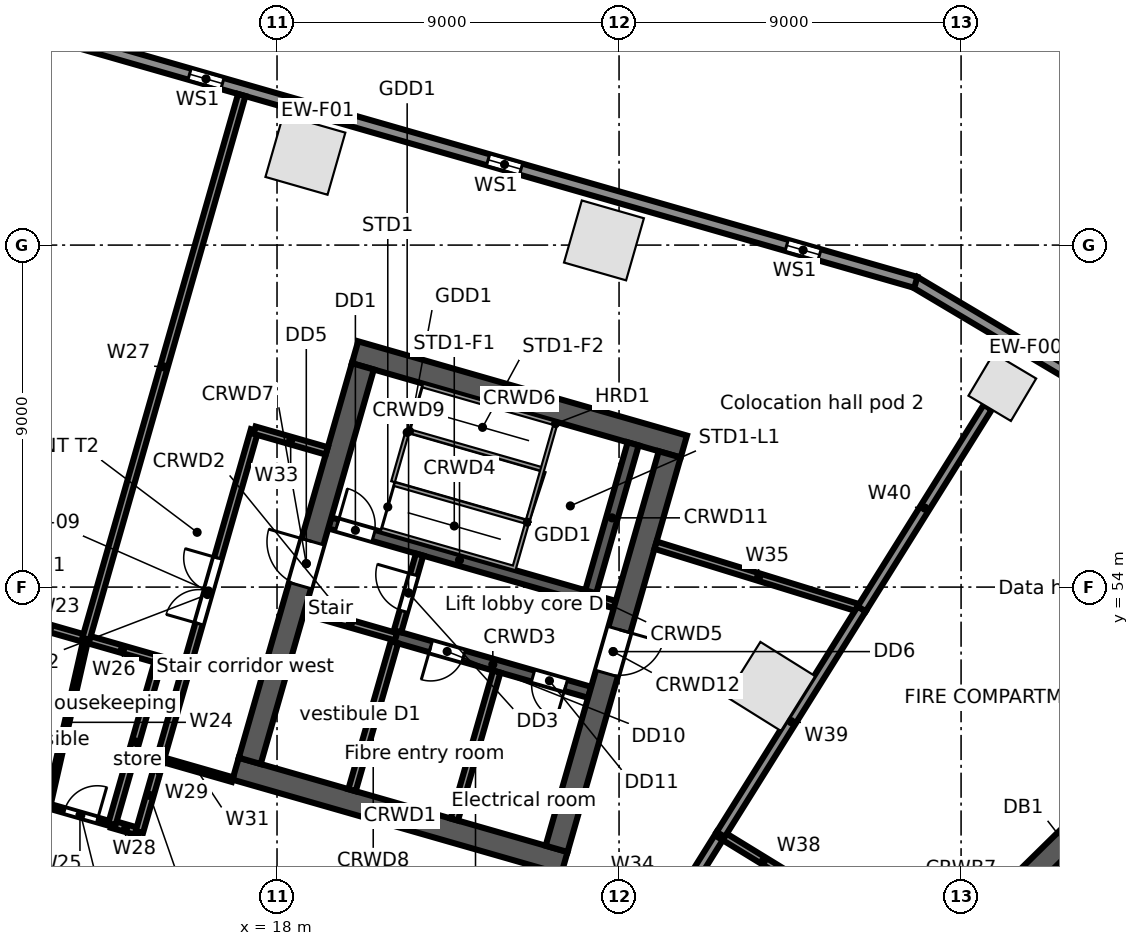
"""IFC4 building model, lengths in metres.
Left out: names, types, materials, properties, quantities, classifications, styles, units other than length and angle.
Written with IfcOpenShell. Run it as: python <this file> out.ifc"""

import sys

from ifc_helpers import new_model, si_unit, direction, frame, frame_2d, origin, origin_2d, place, context, subcontext, project, spatial, rectangle, extrude, element, fill, save


model = new_model("IFC4")
c1 = context("Model", 3, precision=1e-05, world=origin(), true_north=direction((0.0, 1.0)))
c2 = subcontext(c1, "Body", "Model", "MODEL_VIEW")
j1 = project(units=[si_unit("LENGTHUNIT", "METRE"), si_unit("PLANEANGLEUNIT", "RADIAN")], contexts=[c1])
p1 = place(None, origin())
s1 = spatial("IfcSite", under=j1, at=p1, CompositionType="ELEMENT")
p2 = place(p1, origin())
s2 = spatial("IfcBuilding", under=s1, at=p2, CompositionType="ELEMENT")
p3 = place(p2, frame((0.0, 0.0, 36.5)))
s3 = spatial("IfcBuildingStorey", under=s2, at=p3, CompositionType="ELEMENT", Elevation=36.5)
p4 = place(p3, frame((37.085, 59.262, 0.0), z_axis=(0.0, 0.0, 1.0), x_axis=(-0.859406411501, 0.511293086077, 0.0)))
e1 = element("IfcColumn", 1, at=p4, inside=s3, PredefinedType="COLUMN", context=c2, shape_type="SweptSolid", body=[
    extrude(rectangle(XDim=1.3, YDim=1.3, at=origin_2d()), origin(), (0.0, 0.0, 1.0), 5.0),
])
for number, where, z_axis, x_axis in (
    (2, (26.603, 63.124, 0.0), (0.0, 0.0, 1.0), (-0.961, 0.276, 0.0)),
    (3, (18.746, 65.376, 0.0), (0.0, 0.0, 1.0), (-0.961, 0.276, 0.0)),
    (4, (30.99, 51.386, 0.0), (0.0, 0.0, 1.0), (0.53, 0.848, 0.0)),
):
    element("IfcColumn", number, at=place(p3, frame(where, z_axis=z_axis, x_axis=x_axis)), inside=s3, PredefinedType="COLUMN", context=c2, shape_type="SweptSolid", body=[
        extrude(rectangle(XDim=1.7, YDim=1.7, at=origin_2d()), origin(), (0.0, 0.0, 1.0), 5.0),
    ])
p5 = place(p3, frame((34.773, 62.034, 0.0), z_axis=(0.0, 0.0, 1.0), x_axis=(0.859401317772, -0.511301647769, 0.0)))
e5 = element("IfcWall", 5, at=p5, inside=s3, PredefinedType="STANDARD", context=c2, shape_type="SweptSolid", body=[
    extrude(rectangle(XDim=6.808, YDim=0.3, at=frame_2d((3.404, 0.0))), origin(), (0.0, 0.0, 1.0), 4.68),
])
p6 = place(p3, frame((3.335, 71.044, 0.0), z_axis=(0.0, 0.0, 1.0), x_axis=(0.961260130989, -0.275642813387, 0.0)))
e6 = element("IfcWall", 6, at=p6, inside=s3, PredefinedType="STANDARD", context=c2, shape_type="SweptSolid", body=[
    extrude(rectangle(XDim=32.741, YDim=0.3, at=frame_2d((16.371, 0.0))), origin(), (0.0, 0.0, 1.0), 4.68),
])
p7 = place(p6, frame((29.207, 0.0, 0.6)))
e7 = element("IfcOpeningElement", 7, at=p7, cuts=e6, PredefinedType="OPENING", context=c2, shape_type="SweptSolid", body=[
    extrude(rectangle(XDim=0.9, YDim=3.2, at=frame_2d((0.45, 1.6))), frame((0.0, 0.16, 0.0), z_axis=(0.0, -1.0, 0.0), x_axis=(1.0, 0.0, 0.0)), (0.0, 0.0, 1.0), 0.32),
])
p8 = place(p6, frame((21.034, 0.0, 0.6)))
e8 = element("IfcOpeningElement", 8, at=p8, cuts=e6, PredefinedType="OPENING", context=c2, shape_type="SweptSolid", body=[
    extrude(rectangle(XDim=0.9, YDim=3.2, at=frame_2d((0.45, 1.6))), frame((0.0, 0.16, 0.0), z_axis=(0.0, -1.0, 0.0), x_axis=(1.0, 0.0, 0.0)), (0.0, 0.0, 1.0), 0.32),
])
p9 = place(p6, frame((12.861, 0.0, 0.6)))
e9 = element("IfcOpeningElement", 9, at=p9, cuts=e6, PredefinedType="OPENING", context=c2, shape_type="SweptSolid", body=[
    extrude(rectangle(XDim=0.9, YDim=3.2, at=frame_2d((0.45, 1.6))), frame((0.0, 0.16, 0.0), z_axis=(0.0, -1.0, 0.0), x_axis=(1.0, 0.0, 0.0)), (0.0, 0.0, 1.0), 0.32),
])
p10 = place(p6, frame((4.688, 0.0, 0.6)))
e10 = element("IfcOpeningElement", 10, at=p10, cuts=e6, PredefinedType="OPENING", context=c2, shape_type="SweptSolid", body=[
    extrude(rectangle(XDim=0.9, YDim=3.2, at=frame_2d((0.45, 1.6))), frame((0.0, 0.16, 0.0), z_axis=(0.0, -1.0, 0.0), x_axis=(1.0, 0.0, 0.0)), (0.0, 0.0, 1.0), 0.32),
])
p11 = place(p3, frame((25.398, 40.717, 0.0), z_axis=(0.0, 0.0, 1.0), x_axis=(-0.961262423262, 0.275634819324, 0.0)))
e11 = element("IfcWall", 11, at=p11, inside=s3, PredefinedType="STANDARD", context=c2, shape_type="SweptSolid", body=[
    extrude(rectangle(XDim=26.359, YDim=0.3, at=frame_2d((13.179, 0.0))), origin(), (0.0, 0.0, 1.0), 4.68),
])
p12 = place(p11, frame((22.664, 0.0, 0.6)))
e12 = element("IfcOpeningElement", 12, at=p12, cuts=e11, PredefinedType="OPENING", context=c2, shape_type="SweptSolid", body=[
    extrude(rectangle(XDim=0.9, YDim=3.2, at=frame_2d((0.45, 1.6))), frame((0.0, 0.16, 0.0), z_axis=(0.0, -1.0, 0.0), x_axis=(1.0, 0.0, 0.0)), (0.0, 0.0, 1.0), 0.32),
])
p13 = place(p11, frame((13.844, 0.0, 0.6)))
e13 = element("IfcOpeningElement", 13, at=p13, cuts=e11, PredefinedType="OPENING", context=c2, shape_type="SweptSolid", body=[
    extrude(rectangle(XDim=0.9, YDim=3.2, at=frame_2d((0.45, 1.6))), frame((0.0, 0.16, 0.0), z_axis=(0.0, -1.0, 0.0), x_axis=(1.0, 0.0, 0.0)), (0.0, 0.0, 1.0), 0.32),
])
p14 = place(p11, frame((5.023, 0.0, 0.6)))
e14 = element("IfcOpeningElement", 14, at=p14, cuts=e11, PredefinedType="OPENING", context=c2, shape_type="SweptSolid", body=[
    extrude(rectangle(XDim=0.9, YDim=3.2, at=frame_2d((0.45, 1.6))), frame((0.0, 0.16, 0.0), z_axis=(0.0, -1.0, 0.0), x_axis=(1.0, 0.0, 0.0)), (0.0, 0.0, 1.0), 0.32),
])
p15 = place(p3, frame((32.07, 40.759, 0.0), z_axis=(0.0, 0.0, 1.0), x_axis=(0.713245344712, 0.70091445858, 0.0)))
e15 = element("IfcWall", 15, at=p15, inside=s3, PredefinedType="SOLIDWALL", context=c2, shape_type="SweptSolid", body=[
    extrude(rectangle(XDim=13.8, YDim=0.6, at=frame_2d((6.9, 0.0))), origin(), (0.0, 0.0, 1.0), 4.68),
])
p16 = place(p3, frame((16.911, 49.221, 0.0), z_axis=(0.0, 0.0, 1.0), x_axis=(0.96126248289, -0.275634611374, 0.0)))
e16 = element("IfcWall", 16, at=p16, inside=s3, PredefinedType="SOLIDWALL", context=c2, shape_type="SweptSolid", body=[
    extrude(rectangle(XDim=9.0, YDim=0.6, at=frame_2d((4.5, 0.0))), origin(), (0.0, 0.0, 1.0), 4.68),
])
p17 = place(p3, frame((18.728, 53.382, 0.0), z_axis=(0.0, 0.0, 1.0), x_axis=(0.961247070632, -0.275688355216, 0.0)))
e17 = element("IfcWall", 17, at=p17, inside=s3, PredefinedType="SOLIDWALL", context=c2, shape_type="SweptSolid", body=[
    extrude(rectangle(XDim=2.5, YDim=0.2, at=frame_2d((1.25, 0.0))), origin(), (0.0, 0.0, 1.0), 4.68),
])
p18 = place(p3, frame((21.131, 52.692, 0.0), z_axis=(0.0, 0.0, 1.0), x_axis=(0.961271492568, -0.275603188616, 0.0)))
e18 = element("IfcWall", 18, at=p18, inside=s3, PredefinedType="SOLIDWALL", context=c2, shape_type="SweptSolid", body=[
    extrude(rectangle(XDim=5.3, YDim=0.3, at=frame_2d((2.65, 0.0))), origin(), (0.0, 0.0, 1.0), 4.68),
])
p19 = place(p18, frame((0.95, 0.0, 0.0)))
e19 = element("IfcOpeningElement", 19, at=p19, cuts=e18, PredefinedType="OPENING", context=c2, shape_type="SweptSolid", body=[
    extrude(rectangle(XDim=0.9, YDim=2.1, at=frame_2d((0.45, 1.05))), frame((0.0, 0.16, 0.0), z_axis=(0.0, -1.0, 0.0), x_axis=(1.0, 0.0, 0.0)), (0.0, 0.0, 1.0), 0.32),
])
p20 = place(p18, frame((3.75, 0.0, 0.0)))
e20 = element("IfcOpeningElement", 20, at=p20, cuts=e18, PredefinedType="OPENING", context=c2, shape_type="SweptSolid", body=[
    extrude(rectangle(XDim=0.9, YDim=2.1, at=frame_2d((0.45, 1.05))), frame((0.0, 0.16, 0.0), z_axis=(0.0, -1.0, 0.0), x_axis=(1.0, 0.0, 0.0)), (0.0, 0.0, 1.0), 0.32),
])
p21 = place(p3, frame((19.389, 55.689, 0.0), z_axis=(0.0, 0.0, 1.0), x_axis=(0.961261397636, -0.275638396117, 0.0)))
e21 = element("IfcWall", 21, at=p21, inside=s3, PredefinedType="SOLIDWALL", context=c2, shape_type="SweptSolid", body=[
    extrude(rectangle(XDim=7.1, YDim=0.3, at=frame_2d((3.55, 0.0))), origin(), (0.0, 0.0, 1.0), 4.68),
])
p22 = place(p21, frame((0.2, 0.0, 0.0)))
e22 = element("IfcOpeningElement", 22, at=p22, cuts=e21, PredefinedType="OPENING", context=c2, shape_type="SweptSolid", body=[
    extrude(rectangle(XDim=1.0, YDim=2.1, at=frame_2d((0.5, 1.05))), frame((0.0, 0.16, 0.0), z_axis=(0.0, -1.0, 0.0), x_axis=(1.0, 0.0, 0.0)), (0.0, 0.0, 1.0), 0.32),
])
p23 = place(p3, frame((26.214, 53.732, 0.0), z_axis=(0.0, 0.0, 1.0), x_axis=(0.96122076476, -0.27578005982, 0.0)))
e23 = element("IfcWall", 23, at=p23, inside=s3, PredefinedType="SOLIDWALL", context=c2, shape_type="SweptSolid", body=[
    extrude(rectangle(XDim=0.7, YDim=0.2, at=frame_2d((0.35, 0.0))), origin(), (0.0, 0.0, 1.0), 4.68),
])
p24 = place(p3, frame((20.053, 60.18, 0.0), z_axis=(0.0, 0.0, 1.0), x_axis=(0.96126248289, -0.275634611374, 0.0)))
e24 = element("IfcWall", 24, at=p24, inside=s3, PredefinedType="SOLIDWALL", context=c2, shape_type="SweptSolid", body=[
    extrude(rectangle(XDim=9.0, YDim=0.6, at=frame_2d((4.5, 0.0))), origin(), (0.0, 0.0, 1.0), 4.68),
])
p25 = place(p3, frame((17.282, 49.427, 0.0), z_axis=(0.0, 0.0, 1.0), x_axis=(0.275631631629, 0.961263337304, 0.0)))
e25 = element("IfcWall", 25, at=p25, inside=s3, PredefinedType="SOLIDWALL", context=c2, shape_type="SweptSolid", body=[
    extrude(rectangle(XDim=10.8, YDim=0.6, at=frame_2d((5.4, 0.0))), origin(), (0.0, 0.0, 1.0), 4.68),
])
p26 = place(p25, frame((4.8, 0.0, 0.0)))
e26 = element("IfcOpeningElement", 26, at=p26, cuts=e25, PredefinedType="OPENING", context=c2, shape_type="SweptSolid", body=[
    extrude(rectangle(XDim=1.2, YDim=2.1, at=frame_2d((0.6, 1.05))), frame((0.0, 0.31, 0.0), z_axis=(0.0, -1.0, 0.0), x_axis=(1.0, 0.0, 0.0)), (0.0, 0.0, 1.0), 0.62),
])
p27 = place(p3, frame((19.973, 48.655, 0.0), z_axis=(0.0, 0.0, 1.0), x_axis=(0.275668441653, 0.961252781674, 0.0)))
e27 = element("IfcWall", 27, at=p27, inside=s3, PredefinedType="SOLIDWALL", context=c2, shape_type="SweptSolid", body=[
    extrude(rectangle(XDim=4.05, YDim=0.2, at=frame_2d((2.025, 0.0))), origin(), (0.0, 0.0, 1.0), 4.68),
])
p28 = place(p3, frame((21.172, 52.837, 0.0), z_axis=(0.0, 0.0, 1.0), x_axis=(0.275657676022, 0.961255868981, 0.0)))
e28 = element("IfcWall", 28, at=p28, inside=s3, PredefinedType="PARTITIONING", context=c2, shape_type="SweptSolid", body=[
    extrude(rectangle(XDim=2.1, YDim=0.2, at=frame_2d((1.05, 0.0))), origin(), (0.0, 0.0, 1.0), 4.68),
])
p29 = place(p28, frame((0.55, 0.0, 0.0)))
e29 = element("IfcOpeningElement", 29, at=p29, cuts=e28, PredefinedType="OPENING", context=c2, shape_type="SweptSolid", body=[
    extrude(rectangle(XDim=1.0, YDim=2.1, at=frame_2d((0.5, 1.05))), frame((0.0, 0.11, 0.0), z_axis=(0.0, -1.0, 0.0), x_axis=(1.0, 0.0, 0.0)), (0.0, 0.0, 1.0), 0.22),
])
p30 = place(p3, frame((22.665, 47.883, 0.0), z_axis=(0.0, 0.0, 1.0), x_axis=(0.275596769212, 0.961273333033, 0.0)))
e30 = element("IfcWall", 30, at=p30, inside=s3, PredefinedType="PARTITIONING", context=c2, shape_type="SweptSolid", body=[
    extrude(rectangle(XDim=4.05, YDim=0.2, at=frame_2d((2.025, 0.0))), origin(), (0.0, 0.0, 1.0), 4.68),
])
p31 = place(p3, frame((26.256, 53.876, 0.0), z_axis=(0.0, 0.0, 1.0), x_axis=(0.275612739511, 0.961268754209, 0.0)))
e31 = element("IfcWall", 31, at=p31, inside=s3, PredefinedType="SOLIDWALL", context=c2, shape_type="SweptSolid", body=[
    extrude(rectangle(XDim=4.05, YDim=0.3, at=frame_2d((2.025, 0.0))), origin(), (0.0, 0.0, 1.0), 4.68),
])
p32 = place(p3, frame((25.356, 47.112, 0.0), z_axis=(0.0, 0.0, 1.0), x_axis=(0.275631631629, 0.961263337304, 0.0)))
e32 = element("IfcWall", 32, at=p32, inside=s3, PredefinedType="SOLIDWALL", context=c2, shape_type="SweptSolid", body=[
    extrude(rectangle(XDim=10.8, YDim=0.6, at=frame_2d((5.4, 0.0))), origin(), (0.0, 0.0, 1.0), 4.68),
])
p33 = place(p32, frame((4.8, 0.0, 0.0)))
e33 = element("IfcOpeningElement", 33, at=p33, cuts=e32, PredefinedType="OPENING", context=c2, shape_type="SweptSolid", body=[
    extrude(rectangle(XDim=1.2, YDim=2.1, at=frame_2d((0.6, 1.05))), frame((0.0, 0.31, 0.0), z_axis=(0.0, -1.0, 0.0), x_axis=(1.0, 0.0, 0.0)), (0.0, 0.0, 1.0), 0.62),
])
p34 = place(p3, frame((11.051, 53.19, 0.0), z_axis=(0.0, 0.0, 1.0), x_axis=(0.961316434736, -0.275446387355, 0.0)))
e34 = element("IfcWall", 34, at=p34, inside=s3, PredefinedType="PARTITIONING", context=c2, shape_type="SweptSolid", body=[
    extrude(rectangle(XDim=2.0, YDim=0.2, at=frame_2d((1.0, 0.0))), origin(), (0.0, 0.0, 1.0), 4.68),
])
p35 = place(p3, frame((11.973, 48.244, 0.0), z_axis=(0.0, 0.0, 1.0), x_axis=(0.222117362571, 0.975019936845, 0.0)))
e35 = element("IfcWall", 35, at=p35, inside=s3, PredefinedType="PARTITIONING", context=c2, shape_type="SweptSolid", body=[
    extrude(rectangle(XDim=4.508, YDim=0.125, at=frame_2d((2.254, 0.0))), origin(), (0.0, 0.0, 1.0), 4.68),
])
p36 = place(p3, frame((11.973, 48.244, 0.0), z_axis=(0.0, 0.0, 1.0), x_axis=(0.96136592135, -0.275273618907, 0.0)))
e36 = element("IfcWall", 36, at=p36, inside=s3, PredefinedType="PARTITIONING", context=c2, shape_type="SweptSolid", body=[
    extrude(rectangle(XDim=1.751, YDim=0.125, at=frame_2d((0.875, 0.0))), origin(), (0.0, 0.0, 1.0), 4.68),
])
p37 = place(p36, frame((0.45, 0.0, 0.0)))
e37 = element("IfcOpeningElement", 37, at=p37, cuts=e36, PredefinedType="OPENING", context=c2, shape_type="SweptSolid", body=[
    extrude(rectangle(XDim=0.9, YDim=2.1, at=frame_2d((0.45, 1.05))), frame((0.0, 0.073, 0.0), z_axis=(0.0, -1.0, 0.0), x_axis=(1.0, 0.0, 0.0)), (0.0, 0.0, 1.0), 0.145),
])
p38 = place(p3, frame((12.974, 52.639, 0.0), z_axis=(0.0, 0.0, 1.0), x_axis=(0.961270097305, -0.275608055084, 0.0)))
e38 = element("IfcWall", 38, at=p38, inside=s3, PredefinedType="PARTITIONING", context=c2, shape_type="SweptSolid", body=[
    extrude(rectangle(XDim=1.999, YDim=0.2, at=frame_2d((1.0, 0.0))), origin(), (0.0, 0.0, 1.0), 4.68),
])
p39 = place(p3, frame((12.974, 52.639, 0.0), z_axis=(0.0, 0.0, 1.0), x_axis=(0.275299463768, 0.961358520662, 0.0)))
e39 = element("IfcWall", 39, at=p39, inside=s3, PredefinedType="PARTITIONING", context=c2, shape_type="SweptSolid", body=[
    extrude(rectangle(XDim=14.885, YDim=0.2, at=frame_2d((7.443, 0.0))), origin(), (0.0, 0.0, 1.0), 3.742),
])
p40 = place(p3, frame((13.656, 47.762, 0.0), z_axis=(0.0, 0.0, 1.0), x_axis=(0.961154610169, -0.276010534854, 0.0)))
e40 = element("IfcWall", 40, at=p40, inside=s3, PredefinedType="PARTITIONING", context=c2, shape_type="SweptSolid", body=[
    extrude(rectangle(XDim=0.75, YDim=0.2, at=frame_2d((0.375, 0.0))), origin(), (0.0, 0.0, 1.0), 4.68),
])
p41 = place(p3, frame((13.656, 47.762, 0.0), z_axis=(0.0, 0.0, 1.0), x_axis=(0.275545040649, 0.96128816209, 0.0)))
e41 = element("IfcWall", 41, at=p41, inside=s3, PredefinedType="PARTITIONING", context=c2, shape_type="SweptSolid", body=[
    extrude(rectangle(XDim=4.5, YDim=0.2, at=frame_2d((2.25, 0.0))), origin(), (0.0, 0.0, 1.0), 4.68),
])
p42 = place(p3, frame((14.377, 47.555, 0.0), z_axis=(0.0, 0.0, 1.0), x_axis=(0.275446387355, 0.961316434736, 0.0)))
e42 = element("IfcWall", 42, at=p42, inside=s3, PredefinedType="PARTITIONING", context=c2, shape_type="SweptSolid", body=[
    extrude(rectangle(XDim=2.0, YDim=0.2, at=frame_2d((1.0, 0.0))), origin(), (0.0, 0.0, 1.0), 4.68),
])
p43 = place(p3, frame((14.928, 49.478, 0.0), z_axis=(0.0, 0.0, 1.0), x_axis=(0.961243778232, -0.27569983462, 0.0)))
e43 = element("IfcWall", 43, at=p43, inside=s3, PredefinedType="PARTITIONING", context=c2, shape_type="SweptSolid", body=[
    extrude(rectangle(XDim=1.977, YDim=0.125, at=frame_2d((0.988, 0.0))), origin(), (0.0, 0.0, 1.0), 4.68),
])
p44 = place(p3, frame((14.928, 49.478, 0.0), z_axis=(0.0, 0.0, 1.0), x_axis=(0.275674053528, 0.961251172281, 0.0)))
e44 = element("IfcWall", 44, at=p44, inside=s3, PredefinedType="PARTITIONING", context=c2, shape_type="SweptSolid", body=[
    extrude(rectangle(XDim=9.0, YDim=0.2, at=frame_2d((4.5, 0.0))), origin(), (0.0, 0.0, 1.0), 3.742),
])
p45 = place(p44, frame((3.7, 0.0, 0.0)))
e45 = element("IfcOpeningElement", 45, at=p45, cuts=e44, PredefinedType="OPENING", context=c2, shape_type="SweptSolid", body=[
    extrude(rectangle(XDim=1.8, YDim=2.1, at=frame_2d((0.9, 1.05))), frame((0.0, 0.11, 0.0), z_axis=(0.0, -1.0, 0.0), x_axis=(1.0, 0.0, 0.0)), (0.0, 0.0, 1.0), 0.22),
])
p46 = place(p3, frame((17.409, 58.129, 0.0), z_axis=(0.0, 0.0, 1.0), x_axis=(0.961253165474, -0.275667103345, 0.0)))
e46 = element("IfcWall", 46, at=p46, inside=s3, PredefinedType="PARTITIONING", context=c2, shape_type="SweptSolid", body=[
    extrude(rectangle(XDim=1.977, YDim=0.2, at=frame_2d((0.988, 0.0))), origin(), (0.0, 0.0, 1.0), 4.68),
])
p47 = place(p3, frame((26.456, 42.338, 0.0), z_axis=(0.0, 0.0, 1.0), x_axis=(0.52980027265, 0.848122438743, 0.0)))
e47 = element("IfcWall", 47, at=p47, inside=s3, PredefinedType="PARTITIONING", context=c2, shape_type="SweptSolid", body=[
    extrude(rectangle(XDim=6.076, YDim=0.25, at=frame_2d((3.038, 0.0))), origin(), (0.0, 0.0, 1.0), 4.68),
])
p48 = place(p47, frame((2.2, 0.0, 0.0)))
e48 = element("IfcOpeningElement", 48, at=p48, cuts=e47, PredefinedType="OPENING", context=c2, shape_type="SweptSolid", body=[
    extrude(rectangle(XDim=1.8, YDim=2.1, at=frame_2d((0.9, 1.05))), frame((0.0, 0.135, 0.0), z_axis=(0.0, -1.0, 0.0), x_axis=(1.0, 0.0, 0.0)), (0.0, 0.0, 1.0), 0.27),
])
p49 = place(p3, frame((27.96, 55.103, 0.0), z_axis=(0.0, 0.0, 1.0), x_axis=(0.955442775069, -0.29517639399, 0.0)))
e49 = element("IfcWall", 49, at=p49, inside=s3, PredefinedType="PARTITIONING", context=c2, shape_type="SweptSolid", body=[
    extrude(rectangle(XDim=5.678, YDim=0.2, at=frame_2d((2.839, 0.0))), origin(), (0.0, 0.0, 1.0), 3.748),
])
p50 = place(p3, frame((29.675, 47.491, 0.0), z_axis=(0.0, 0.0, 1.0), x_axis=(0.852591965232, -0.522577210392, 0.0)))
e50 = element("IfcWall", 50, at=p50, inside=s3, PredefinedType="PARTITIONING", context=c2, shape_type="SweptSolid", body=[
    extrude(rectangle(XDim=2.645, YDim=0.2, at=frame_2d((1.322, 0.0))), origin(), (0.0, 0.0, 1.0), 4.68),
])
p51 = place(p3, frame((29.675, 47.491, 0.0), z_axis=(0.0, 0.0, 1.0), x_axis=(0.529992669945, 0.848002222759, 0.0)))
e51 = element("IfcWall", 51, at=p51, inside=s3, PredefinedType="PARTITIONING", context=c2, shape_type="SweptSolid", body=[
    extrude(rectangle(XDim=7.0, YDim=0.25, at=frame_2d((3.5, 0.0))), origin(), (0.0, 0.0, 1.0), 3.742),
])
p52 = place(p3, frame((33.385, 53.427, 0.0), z_axis=(0.0, 0.0, 1.0), x_axis=(0.529897235032, 0.848061861131, 0.0)))
e52 = element("IfcWall", 52, at=p52, inside=s3, PredefinedType="PARTITIONING", context=c2, shape_type="SweptSolid", body=[
    extrude(rectangle(XDim=6.258, YDim=0.25, at=frame_2d((3.129, 0.0))), origin(), (0.0, 0.0, 1.0), 3.742),
])
p53 = place(p7, origin())
e53 = element("IfcWindow", 53, at=p53, inside=s3, PartitioningType="SINGLE_PANEL", PredefinedType="WINDOW", context=c2, shape_type="SweptSolid", body=[
    extrude(rectangle(XDim=0.9, YDim=3.2, at=frame_2d((0.45, 1.6))), frame((0.0, 0.03, 0.0), z_axis=(0.0, -1.0, 0.0), x_axis=(1.0, 0.0, 0.0)), (0.0, 0.0, 1.0), 0.06),
])
fill(e7, e53)
p54 = place(p8, origin())
e54 = element("IfcWindow", 54, at=p54, inside=s3, PartitioningType="SINGLE_PANEL", PredefinedType="WINDOW", context=c2, shape_type="SweptSolid", body=[
    extrude(rectangle(XDim=0.9, YDim=3.2, at=frame_2d((0.45, 1.6))), frame((0.0, 0.03, 0.0), z_axis=(0.0, -1.0, 0.0), x_axis=(1.0, 0.0, 0.0)), (0.0, 0.0, 1.0), 0.06),
])
fill(e8, e54)
p55 = place(p9, origin())
e55 = element("IfcWindow", 55, at=p55, inside=s3, PartitioningType="SINGLE_PANEL", PredefinedType="WINDOW", context=c2, shape_type="SweptSolid", body=[
    extrude(rectangle(XDim=0.9, YDim=3.2, at=frame_2d((0.45, 1.6))), frame((0.0, 0.03, 0.0), z_axis=(0.0, -1.0, 0.0), x_axis=(1.0, 0.0, 0.0)), (0.0, 0.0, 1.0), 0.06),
])
fill(e9, e55)
p56 = place(p22, origin())
e56 = element("IfcDoor", 56, at=p56, inside=s3, OperationType="SINGLE_SWING_LEFT", PredefinedType="DOOR", context=c2, shape_type="SweptSolid", body=[
    extrude(rectangle(XDim=1.0, YDim=2.1, at=frame_2d((0.5, 1.05))), frame((0.0, 0.025, 0.0), z_axis=(0.0, -1.0, 0.0), x_axis=(1.0, 0.0, 0.0)), (0.0, 0.0, 1.0), 0.05),
])
fill(e22, e56)
p57 = place(p29, origin())
e57 = element("IfcDoor", 57, at=p57, inside=s3, OperationType="SINGLE_SWING_RIGHT", PredefinedType="DOOR", context=c2, shape_type="SweptSolid", body=[
    extrude(rectangle(XDim=1.0, YDim=2.1, at=frame_2d((0.5, 1.05))), frame((0.0, 0.025, 0.0), z_axis=(0.0, -1.0, 0.0), x_axis=(1.0, 0.0, 0.0)), (0.0, 0.0, 1.0), 0.05),
])
fill(e29, e57)
p58 = place(p26, origin())
e58 = element("IfcDoor", 58, at=p58, inside=s3, OperationType="SINGLE_SWING_RIGHT", PredefinedType="DOOR", context=c2, shape_type="SweptSolid", body=[
    extrude(rectangle(XDim=1.2, YDim=2.1, at=frame_2d((0.6, 1.05))), frame((0.0, 0.025, 0.0), z_axis=(0.0, -1.0, 0.0), x_axis=(1.0, 0.0, 0.0)), (0.0, 0.0, 1.0), 0.05),
])
fill(e26, e58)
p59 = place(p33, frame((1.2, 0.0, 0.0), z_axis=(0.0, 0.0, 1.0), x_axis=(-1.0, 0.0, 0.0)))
e59 = element("IfcDoor", 59, at=p59, inside=s3, OperationType="SINGLE_SWING_LEFT", PredefinedType="DOOR", context=c2, shape_type="SweptSolid", body=[
    extrude(rectangle(XDim=1.2, YDim=2.1, at=frame_2d((0.6, 1.05))), frame((0.0, 0.025, 0.0), z_axis=(0.0, -1.0, 0.0), x_axis=(1.0, 0.0, 0.0)), (0.0, 0.0, 1.0), 0.05),
])
fill(e33, e59)
p60 = place(p19, frame((0.9, 0.0, 0.0), z_axis=(0.0, 0.0, 1.0), x_axis=(-1.0, 0.0, 0.0)))
e60 = element("IfcDoor", 60, at=p60, inside=s3, OperationType="SINGLE_SWING_RIGHT", PredefinedType="DOOR", context=c2, shape_type="SweptSolid", body=[
    extrude(rectangle(XDim=0.9, YDim=2.1, at=frame_2d((0.45, 1.05))), frame((0.0, 0.025, 0.0), z_axis=(0.0, -1.0, 0.0), x_axis=(1.0, 0.0, 0.0)), (0.0, 0.0, 1.0), 0.05),
])
fill(e19, e60)
p61 = place(p20, frame((0.9, 0.0, 0.0), z_axis=(0.0, 0.0, 1.0), x_axis=(-1.0, 0.0, 0.0)))
e61 = element("IfcDoor", 61, at=p61, inside=s3, OperationType="SINGLE_SWING_LEFT", PredefinedType="DOOR", context=c2, shape_type="SweptSolid", body=[
    extrude(rectangle(XDim=0.9, YDim=2.1, at=frame_2d((0.45, 1.05))), frame((0.0, 0.025, 0.0), z_axis=(0.0, -1.0, 0.0), x_axis=(1.0, 0.0, 0.0)), (0.0, 0.0, 1.0), 0.05),
])
fill(e20, e61)
p62 = place(p37, origin())
e62 = element("IfcDoor", 62, at=p62, inside=s3, OperationType="SINGLE_SWING_RIGHT", PredefinedType="DOOR", context=c2, shape_type="SweptSolid", body=[
    extrude(rectangle(XDim=0.9, YDim=2.1, at=frame_2d((0.45, 1.05))), frame((0.0, 0.025, 0.0), z_axis=(0.0, -1.0, 0.0), x_axis=(1.0, 0.0, 0.0)), (0.0, 0.0, 1.0), 0.05),
])
fill(e37, e62)
p63 = place(p45, origin())
e63 = element("IfcDoor", 63, at=p63, inside=s3, OperationType="DOUBLE_DOOR_SINGLE_SWING", PredefinedType="DOOR", context=c2, shape_type="SweptSolid", body=[
    extrude(rectangle(XDim=1.8, YDim=2.1, at=frame_2d((0.9, 1.05))), frame((0.0, 0.025, 0.0), z_axis=(0.0, -1.0, 0.0), x_axis=(1.0, 0.0, 0.0)), (0.0, 0.0, 1.0), 0.05),
])
fill(e45, e63)
save(model, sys.argv[1])
